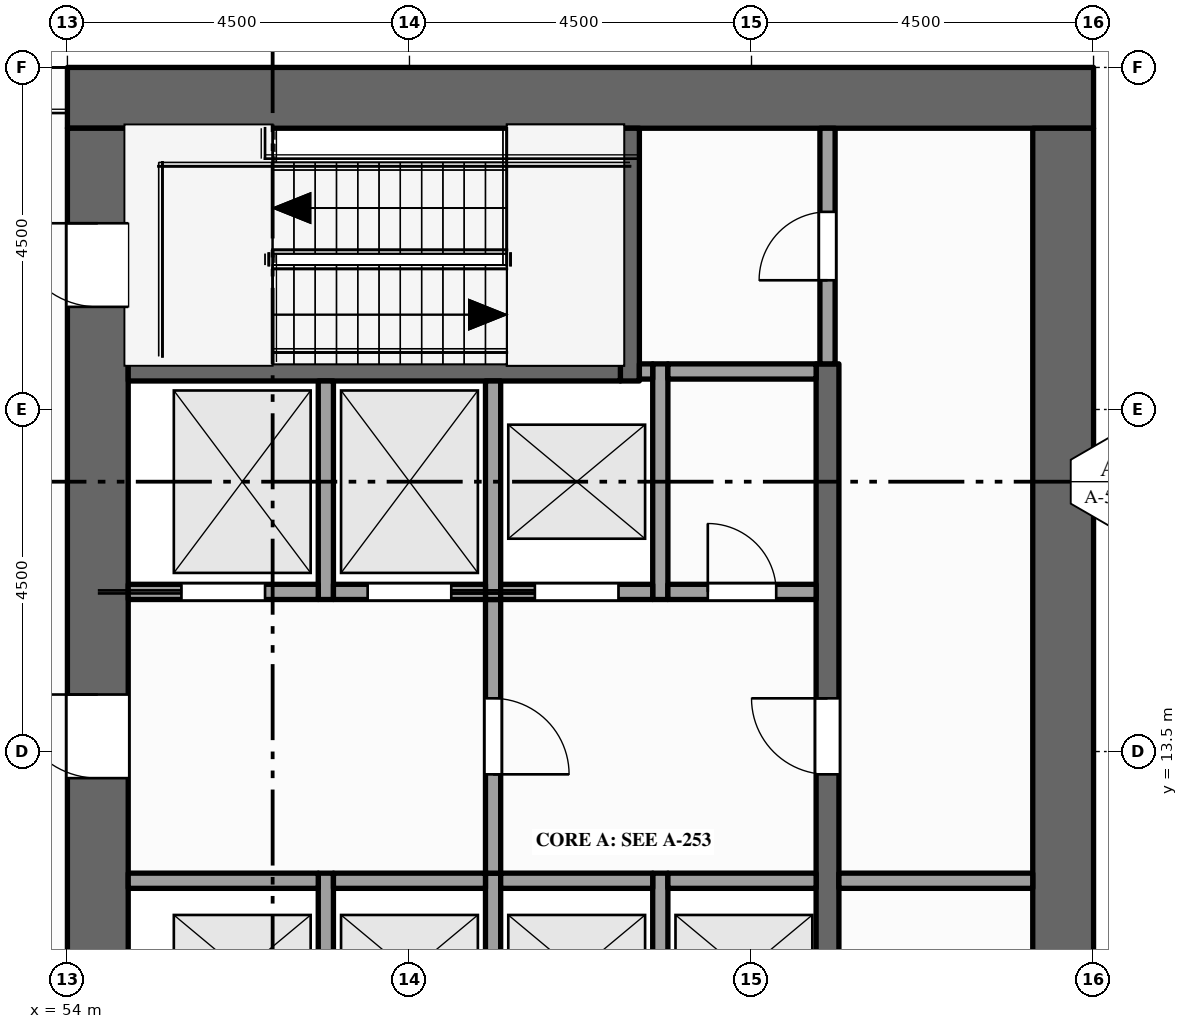
"""IFC4 building model, lengths in metres.
Left out: names, types, materials, properties, quantities, classifications, styles, units other than length and angle.
Written with IfcOpenShell. Run it as: python <this file> out.ifc"""

import sys

from ifc_helpers import new_model, si_unit, direction, frame, frame_2d, origin, place, context, subcontext, project, spatial, rectangle, extrude, element, fill, save


model = new_model("IFC4")
c1 = context("Model", 3, precision=1e-05, world=origin(), true_north=direction((0.0, 1.0)))
c2 = subcontext(c1, "Body", "Model", "MODEL_VIEW")
j1 = project(units=[si_unit("LENGTHUNIT", "METRE"), si_unit("PLANEANGLEUNIT", "RADIAN")], contexts=[c1])
p1 = place(None, origin())
s1 = spatial("IfcSite", under=j1, at=p1, CompositionType="ELEMENT")
p2 = place(p1, origin())
s2 = spatial("IfcBuilding", under=s1, at=p2, CompositionType="ELEMENT")
p3 = place(p2, frame((0.0, 0.0, 297.0)))
s3 = spatial("IfcBuildingStorey", under=s2, at=p3, CompositionType="ELEMENT", Elevation=297.0)
p4 = place(p3, frame((54.0, 22.1, -0.15), z_axis=(0.0, 0.0, 1.0), x_axis=(1.0, 0.0, 0.0)))
e1 = element("IfcWall", 1, at=p4, inside=s3, PredefinedType="SHEAR", context=c2, shape_type="SweptSolid", body=[
    extrude(rectangle(XDim=13.5, YDim=0.8, at=frame_2d((6.75, 0.0))), origin(), (0.0, 0.0, 1.0), 8.0),
])
p5 = place(p3, frame((54.4, 0.8, -0.15), z_axis=(0.0, 0.0, 1.0), x_axis=(0.0, 1.0, 0.0)))
e2 = element("IfcWall", 2, at=p5, inside=s3, PredefinedType="SHEAR", context=c2, shape_type="SweptSolid", body=[
    extrude(rectangle(XDim=20.9, YDim=0.8, at=frame_2d((10.45, 0.0))), origin(), (0.0, 0.0, 1.0), 8.0),
])
p6 = place(p5, frame((6.3, 0.0, 0.15)))
e3 = element("IfcOpeningElement", 3, at=p6, cuts=e2, PredefinedType="OPENING", context=c2, shape_type="SweptSolid", body=[
    extrude(rectangle(XDim=1.8, YDim=2.1, at=frame_2d((0.9, 1.05))), frame((0.0, 0.41, 0.0), z_axis=(0.0, -1.0, 0.0), x_axis=(1.0, 0.0, 0.0)), (0.0, 0.0, 1.0), 0.82),
])
p7 = place(p5, frame((12.35, 0.0, 0.15)))
e4 = element("IfcOpeningElement", 4, at=p7, cuts=e2, PredefinedType="OPENING", context=c2, shape_type="SweptSolid", body=[
    extrude(rectangle(XDim=1.1, YDim=2.1, at=frame_2d((0.55, 1.05))), frame((0.0, 0.41, 0.0), z_axis=(0.0, -1.0, 0.0), x_axis=(1.0, 0.0, 0.0)), (0.0, 0.0, 1.0), 0.82),
])
p8 = place(p5, frame((1.35, 0.0, 0.15)))
e5 = element("IfcOpeningElement", 5, at=p8, cuts=e2, PredefinedType="OPENING", context=c2, shape_type="SweptSolid", body=[
    extrude(rectangle(XDim=1.1, YDim=2.1, at=frame_2d((0.55, 1.05))), frame((0.0, 0.41, 0.0), z_axis=(0.0, -1.0, 0.0), x_axis=(1.0, 0.0, 0.0)), (0.0, 0.0, 1.0), 0.82),
])
p9 = place(p5, frame((18.55, 0.0, 0.15)))
e6 = element("IfcOpeningElement", 6, at=p9, cuts=e2, PredefinedType="OPENING", context=c2, shape_type="SweptSolid", body=[
    extrude(rectangle(XDim=1.1, YDim=2.1, at=frame_2d((0.55, 1.05))), frame((0.0, 0.41, 0.0), z_axis=(0.0, -1.0, 0.0), x_axis=(1.0, 0.0, 0.0)), (0.0, 0.0, 1.0), 0.82),
])
p10 = place(p3, frame((67.1, 0.8, -0.15), z_axis=(0.0, 0.0, 1.0), x_axis=(0.0, 1.0, 0.0)))
e7 = element("IfcWall", 7, at=p10, inside=s3, PredefinedType="SHEAR", context=c2, shape_type="SweptSolid", body=[
    extrude(rectangle(XDim=20.9, YDim=0.8, at=frame_2d((10.45, 0.0))), origin(), (0.0, 0.0, 1.0), 8.0),
])
p11 = place(p3, frame((57.4, 9.3, 0.0), z_axis=(0.0, 0.0, 1.0), x_axis=(0.0, 1.0, 0.0)))
e8 = element("IfcWall", 8, at=p11, inside=s3, PredefinedType="SOLIDWALL", context=c2, shape_type="SweptSolid", body=[
    extrude(rectangle(XDim=2.6, YDim=0.2, at=frame_2d((1.3, 0.0))), origin(), (0.0, 0.0, 1.0), 7.85),
])
p12 = place(p3, frame((57.4, 15.5, 0.0), z_axis=(0.0, 0.0, 1.0), x_axis=(0.0, 1.0, 0.0)))
e9 = element("IfcWall", 9, at=p12, inside=s3, PredefinedType="SOLIDWALL", context=c2, shape_type="SweptSolid", body=[
    extrude(rectangle(XDim=2.875, YDim=0.2, at=frame_2d((1.438, 0.0))), origin(), (0.0, 0.0, 1.0), 7.85),
])
p13 = place(p3, frame((59.6, 9.3, 0.0), z_axis=(0.0, 0.0, 1.0), x_axis=(0.0, 1.0, 0.0)))
e10 = element("IfcWall", 10, at=p13, inside=s3, PredefinedType="SOLIDWALL", context=c2, shape_type="SweptSolid", body=[
    extrude(rectangle(XDim=2.6, YDim=0.2, at=frame_2d((1.3, 0.0))), origin(), (0.0, 0.0, 1.0), 7.85),
])
p14 = place(p3, frame((59.6, 11.9, 0.0), z_axis=(0.0, 0.0, 1.0), x_axis=(0.0, 1.0, 0.0)))
e11 = element("IfcWall", 11, at=p14, inside=s3, PredefinedType="PARTITIONING", context=c2, shape_type="SweptSolid", body=[
    extrude(rectangle(XDim=3.6, YDim=0.2, at=frame_2d((1.8, 0.0))), origin(), (0.0, 0.0, 1.0), 7.85),
])
p15 = place(p14, frame((1.3, 0.0, 0.0)))
e12 = element("IfcOpeningElement", 12, at=p15, cuts=e11, PredefinedType="OPENING", context=c2, shape_type="SweptSolid", body=[
    extrude(rectangle(XDim=1.0, YDim=2.1, at=frame_2d((0.5, 1.05))), frame((0.0, 0.11, 0.0), z_axis=(0.0, -1.0, 0.0), x_axis=(1.0, 0.0, 0.0)), (0.0, 0.0, 1.0), 0.22),
])
p16 = place(p3, frame((59.6, 15.5, 0.0), z_axis=(0.0, 0.0, 1.0), x_axis=(0.0, 1.0, 0.0)))
e13 = element("IfcWall", 13, at=p16, inside=s3, PredefinedType="SOLIDWALL", context=c2, shape_type="SweptSolid", body=[
    extrude(rectangle(XDim=2.875, YDim=0.2, at=frame_2d((1.438, 0.0))), origin(), (0.0, 0.0, 1.0), 7.85),
])
p17 = place(p3, frame((61.4, 18.375, 0.0), z_axis=(0.0, 0.0, 1.0), x_axis=(0.0, 1.0, 0.0)))
e14 = element("IfcWall", 14, at=p17, inside=s3, PredefinedType="SHEAR", context=c2, shape_type="SweptSolid", body=[
    extrude(rectangle(XDim=3.325, YDim=0.25, at=frame_2d((1.663, 0.0))), origin(), (0.0, 0.0, 1.0), 7.85),
])
p18 = place(p3, frame((61.8, 9.3, 0.0), z_axis=(0.0, 0.0, 1.0), x_axis=(0.0, 1.0, 0.0)))
e15 = element("IfcWall", 15, at=p18, inside=s3, PredefinedType="SOLIDWALL", context=c2, shape_type="SweptSolid", body=[
    extrude(rectangle(XDim=2.6, YDim=0.2, at=frame_2d((1.3, 0.0))), origin(), (0.0, 0.0, 1.0), 7.85),
])
p19 = place(p3, frame((61.8, 15.5, 0.0), z_axis=(0.0, 0.0, 1.0), x_axis=(0.0, 1.0, 0.0)))
e16 = element("IfcWall", 16, at=p19, inside=s3, PredefinedType="SOLIDWALL", context=c2, shape_type="SweptSolid", body=[
    extrude(rectangle(XDim=3.1, YDim=0.2, at=frame_2d((1.55, 0.0))), origin(), (0.0, 0.0, 1.0), 7.85),
])
p20 = place(p3, frame((64.0, 4.1, 0.0), z_axis=(0.0, 0.0, 1.0), x_axis=(0.0, 1.0, 0.0)))
e17 = element("IfcWall", 17, at=p20, inside=s3, PredefinedType="SHEAR", context=c2, shape_type="SweptSolid", body=[
    extrude(rectangle(XDim=14.5, YDim=0.3, at=frame_2d((7.25, 0.0))), origin(), (0.0, 0.0, 1.0), 7.85),
])
p21 = place(p20, frame((3.4, 0.0, 0.0)))
e18 = element("IfcOpeningElement", 18, at=p21, cuts=e17, PredefinedType="OPENING", context=c2, shape_type="SweptSolid", body=[
    extrude(rectangle(XDim=1.0, YDim=2.1, at=frame_2d((0.5, 1.05))), frame((0.0, 0.16, 0.0), z_axis=(0.0, -1.0, 0.0), x_axis=(1.0, 0.0, 0.0)), (0.0, 0.0, 1.0), 0.32),
])
p22 = place(p20, frame((9.1, 0.0, 0.0)))
e19 = element("IfcOpeningElement", 19, at=p22, cuts=e17, PredefinedType="OPENING", context=c2, shape_type="SweptSolid", body=[
    extrude(rectangle(XDim=1.0, YDim=2.1, at=frame_2d((0.5, 1.05))), frame((0.0, 0.16, 0.0), z_axis=(0.0, -1.0, 0.0), x_axis=(1.0, 0.0, 0.0)), (0.0, 0.0, 1.0), 0.32),
])
p23 = place(p3, frame((64.0, 18.6, 0.0), z_axis=(0.0, 0.0, 1.0), x_axis=(0.0, 1.0, 0.0)))
e20 = element("IfcWall", 20, at=p23, inside=s3, PredefinedType="PARTITIONING", context=c2, shape_type="SweptSolid", body=[
    extrude(rectangle(XDim=3.1, YDim=0.2, at=frame_2d((1.55, 0.0))), origin(), (0.0, 0.0, 1.0), 7.85),
])
p24 = place(p23, frame((1.1, 0.0, 0.0)))
e21 = element("IfcOpeningElement", 21, at=p24, cuts=e20, PredefinedType="OPENING", context=c2, shape_type="SweptSolid", body=[
    extrude(rectangle(XDim=0.9, YDim=2.1, at=frame_2d((0.45, 1.05))), frame((0.0, 0.11, 0.0), z_axis=(0.0, -1.0, 0.0), x_axis=(1.0, 0.0, 0.0)), (0.0, 0.0, 1.0), 0.22),
])
p25 = place(p3, frame((54.8, 11.8, 0.0), z_axis=(0.0, 0.0, 1.0), x_axis=(1.0, 0.0, 0.0)))
e22 = element("IfcWall", 22, at=p25, inside=s3, PredefinedType="SOLIDWALL", context=c2, shape_type="SweptSolid", body=[
    extrude(rectangle(XDim=2.5, YDim=0.2, at=frame_2d((1.25, 0.0))), origin(), (0.0, 0.0, 1.0), 7.85),
])
for number, where, z_axis, x_axis in (
    (23, (57.5, 11.8, 0.0), (0.0, 0.0, 1.0), (1.0, 0.0, 0.0)),
    (24, (59.7, 11.8, 0.0), (0.0, 0.0, 1.0), (1.0, 0.0, 0.0)),
):
    element("IfcWall", number, at=place(p3, frame(where, z_axis=z_axis, x_axis=x_axis)), inside=s3, PredefinedType="SOLIDWALL", context=c2, shape_type="SweptSolid", body=[
        extrude(rectangle(XDim=2.0, YDim=0.2, at=frame_2d((1.0, 0.0))), origin(), (0.0, 0.0, 1.0), 7.85),
    ])
p26 = place(p3, frame((61.9, 11.8, 0.0), z_axis=(0.0, 0.0, 1.0), x_axis=(1.0, 0.0, 0.0)))
e25 = element("IfcWall", 25, at=p26, inside=s3, PredefinedType="SOLIDWALL", context=c2, shape_type="SweptSolid", body=[
    extrude(rectangle(XDim=1.95, YDim=0.2, at=frame_2d((0.975, 0.0))), origin(), (0.0, 0.0, 1.0), 7.85),
])
p27 = place(p3, frame((64.15, 11.8, 0.0), z_axis=(0.0, 0.0, 1.0), x_axis=(1.0, 0.0, 0.0)))
e26 = element("IfcWall", 26, at=p27, inside=s3, PredefinedType="PARTITIONING", context=c2, shape_type="SweptSolid", body=[
    extrude(rectangle(XDim=2.55, YDim=0.2, at=frame_2d((1.275, 0.0))), origin(), (0.0, 0.0, 1.0), 7.85),
])
p28 = place(p3, frame((54.8, 15.6, 0.0), z_axis=(0.0, 0.0, 1.0), x_axis=(1.0, 0.0, 0.0)))
e27 = element("IfcWall", 27, at=p28, inside=s3, PredefinedType="SOLIDWALL", context=c2, shape_type="SweptSolid", body=[
    extrude(rectangle(XDim=2.5, YDim=0.2, at=frame_2d((1.25, 0.0))), origin(), (0.0, 0.0, 1.0), 7.85),
])
p29 = place(p28, frame((0.7, 0.0, 0.012)))
e28 = element("IfcOpeningElement", 28, at=p29, cuts=e27, PredefinedType="OPENING", context=c2, shape_type="SweptSolid", body=[
    extrude(rectangle(XDim=1.1, YDim=2.1, at=frame_2d((0.55, 1.05))), frame((0.0, 0.11, 0.0), z_axis=(0.0, -1.0, 0.0), x_axis=(1.0, 0.0, 0.0)), (0.0, 0.0, 1.0), 0.22),
])
p30 = place(p3, frame((57.5, 15.6, 0.0), z_axis=(0.0, 0.0, 1.0), x_axis=(1.0, 0.0, 0.0)))
e29 = element("IfcWall", 29, at=p30, inside=s3, PredefinedType="SOLIDWALL", context=c2, shape_type="SweptSolid", body=[
    extrude(rectangle(XDim=2.0, YDim=0.2, at=frame_2d((1.0, 0.0))), origin(), (0.0, 0.0, 1.0), 7.85),
])
p31 = place(p30, frame((0.45, 0.0, 0.012)))
e30 = element("IfcOpeningElement", 30, at=p31, cuts=e29, PredefinedType="OPENING", context=c2, shape_type="SweptSolid", body=[
    extrude(rectangle(XDim=1.1, YDim=2.1, at=frame_2d((0.55, 1.05))), frame((0.0, 0.11, 0.0), z_axis=(0.0, -1.0, 0.0), x_axis=(1.0, 0.0, 0.0)), (0.0, 0.0, 1.0), 0.22),
])
p32 = place(p3, frame((59.7, 15.6, 0.0), z_axis=(0.0, 0.0, 1.0), x_axis=(1.0, 0.0, 0.0)))
e31 = element("IfcWall", 31, at=p32, inside=s3, PredefinedType="SOLIDWALL", context=c2, shape_type="SweptSolid", body=[
    extrude(rectangle(XDim=2.0, YDim=0.2, at=frame_2d((1.0, 0.0))), origin(), (0.0, 0.0, 1.0), 7.85),
])
p33 = place(p32, frame((0.45, 0.0, 0.012)))
e32 = element("IfcOpeningElement", 32, at=p33, cuts=e31, PredefinedType="OPENING", context=c2, shape_type="SweptSolid", body=[
    extrude(rectangle(XDim=1.1, YDim=2.1, at=frame_2d((0.55, 1.05))), frame((0.0, 0.11, 0.0), z_axis=(0.0, -1.0, 0.0), x_axis=(1.0, 0.0, 0.0)), (0.0, 0.0, 1.0), 0.22),
])
p34 = place(p3, frame((61.9, 15.6, 0.0), z_axis=(0.0, 0.0, 1.0), x_axis=(1.0, 0.0, 0.0)))
e33 = element("IfcWall", 33, at=p34, inside=s3, PredefinedType="PARTITIONING", context=c2, shape_type="SweptSolid", body=[
    extrude(rectangle(XDim=1.95, YDim=0.2, at=frame_2d((0.975, 0.0))), origin(), (0.0, 0.0, 1.0), 7.85),
])
p35 = place(p34, frame((0.525, 0.0, 0.0)))
e34 = element("IfcOpeningElement", 34, at=p35, cuts=e33, PredefinedType="OPENING", context=c2, shape_type="SweptSolid", body=[
    extrude(rectangle(XDim=0.9, YDim=2.1, at=frame_2d((0.45, 1.05))), frame((0.0, 0.11, 0.0), z_axis=(0.0, -1.0, 0.0), x_axis=(1.0, 0.0, 0.0)), (0.0, 0.0, 1.0), 0.22),
])
p36 = place(p3, frame((54.8, 18.5, 0.0), z_axis=(0.0, 0.0, 1.0), x_axis=(1.0, 0.0, 0.0)))
e35 = element("IfcWall", 35, at=p36, inside=s3, PredefinedType="SHEAR", context=c2, shape_type="SweptSolid", body=[
    extrude(rectangle(XDim=6.475, YDim=0.25, at=frame_2d((3.237, 0.0))), origin(), (0.0, 0.0, 1.0), 7.85),
])
p37 = place(p3, frame((61.525, 18.5, 0.0), z_axis=(0.0, 0.0, 1.0), x_axis=(1.0, 0.0, 0.0)))
e36 = element("IfcWall", 36, at=p37, inside=s3, PredefinedType="SOLIDWALL", context=c2, shape_type="SweptSolid", body=[
    extrude(rectangle(XDim=0.175, YDim=0.2, at=frame_2d((0.087, 0.0))), origin(), (0.0, 0.0, 1.0), 7.85),
])
p38 = place(p3, frame((61.9, 18.5, 0.0), z_axis=(0.0, 0.0, 1.0), x_axis=(1.0, 0.0, 0.0)))
e37 = element("IfcWall", 37, at=p38, inside=s3, PredefinedType="PARTITIONING", context=c2, shape_type="SweptSolid", body=[
    extrude(rectangle(XDim=1.95, YDim=0.2, at=frame_2d((0.975, 0.0))), origin(), (0.0, 0.0, 1.0), 7.85),
])
p39 = place(p29, origin())
e38 = element("IfcDoor", 38, at=p39, inside=s3, OperationType="SLIDING_TO_LEFT", PredefinedType="DOOR", context=c2, shape_type="SweptSolid", body=[
    extrude(rectangle(XDim=1.1, YDim=2.1, at=frame_2d((0.55, 1.05))), frame((0.0, 0.025, 0.0), z_axis=(0.0, -1.0, 0.0), x_axis=(1.0, 0.0, 0.0)), (0.0, 0.0, 1.0), 0.05),
])
fill(e28, e38)
p40 = place(p31, origin())
e39 = element("IfcDoor", 39, at=p40, inside=s3, OperationType="SLIDING_TO_RIGHT", PredefinedType="DOOR", context=c2, shape_type="SweptSolid", body=[
    extrude(rectangle(XDim=1.1, YDim=2.1, at=frame_2d((0.55, 1.05))), frame((0.0, 0.025, 0.0), z_axis=(0.0, -1.0, 0.0), x_axis=(1.0, 0.0, 0.0)), (0.0, 0.0, 1.0), 0.05),
])
fill(e30, e39)
p41 = place(p33, origin())
e40 = element("IfcDoor", 40, at=p41, inside=s3, OperationType="SLIDING_TO_LEFT", PredefinedType="DOOR", context=c2, shape_type="SweptSolid", body=[
    extrude(rectangle(XDim=1.1, YDim=2.1, at=frame_2d((0.55, 1.05))), frame((0.0, 0.025, 0.0), z_axis=(0.0, -1.0, 0.0), x_axis=(1.0, 0.0, 0.0)), (0.0, 0.0, 1.0), 0.05),
])
fill(e32, e40)
p42 = place(p7, origin())
e41 = element("IfcDoor", 41, at=p42, inside=s3, OperationType="SINGLE_SWING_RIGHT", PredefinedType="DOOR", context=c2, shape_type="SweptSolid", body=[
    extrude(rectangle(XDim=1.1, YDim=2.1, at=frame_2d((0.55, 1.05))), frame((0.0, 0.025, 0.0), z_axis=(0.0, -1.0, 0.0), x_axis=(1.0, 0.0, 0.0)), (0.0, 0.0, 1.0), 0.05),
])
fill(e4, e41)
p43 = place(p15, origin())
e42 = element("IfcDoor", 42, at=p43, inside=s3, OperationType="SINGLE_SWING_LEFT", PredefinedType="DOOR", context=c2, shape_type="SweptSolid", body=[
    extrude(rectangle(XDim=1.0, YDim=2.1, at=frame_2d((0.5, 1.05))), frame((0.0, 0.025, 0.0), z_axis=(0.0, -1.0, 0.0), x_axis=(1.0, 0.0, 0.0)), (0.0, 0.0, 1.0), 0.05),
])
fill(e12, e42)
p44 = place(p22, origin())
e43 = element("IfcDoor", 43, at=p44, inside=s3, OperationType="SINGLE_SWING_RIGHT", PredefinedType="DOOR", context=c2, shape_type="SweptSolid", body=[
    extrude(rectangle(XDim=1.0, YDim=2.1, at=frame_2d((0.5, 1.05))), frame((0.0, 0.025, 0.0), z_axis=(0.0, -1.0, 0.0), x_axis=(1.0, 0.0, 0.0)), (0.0, 0.0, 1.0), 0.05),
])
fill(e19, e43)
p45 = place(p9, origin())
e44 = element("IfcDoor", 44, at=p45, inside=s3, OperationType="SINGLE_SWING_RIGHT", PredefinedType="DOOR", context=c2, shape_type="SweptSolid", body=[
    extrude(rectangle(XDim=1.1, YDim=2.1, at=frame_2d((0.55, 1.05))), frame((0.0, 0.025, 0.0), z_axis=(0.0, -1.0, 0.0), x_axis=(1.0, 0.0, 0.0)), (0.0, 0.0, 1.0), 0.05),
])
fill(e6, e44)
p46 = place(p24, origin())
e45 = element("IfcDoor", 45, at=p46, inside=s3, OperationType="SINGLE_SWING_LEFT", PredefinedType="DOOR", context=c2, shape_type="SweptSolid", body=[
    extrude(rectangle(XDim=0.9, YDim=2.1, at=frame_2d((0.45, 1.05))), frame((0.0, 0.025, 0.0), z_axis=(0.0, -1.0, 0.0), x_axis=(1.0, 0.0, 0.0)), (0.0, 0.0, 1.0), 0.05),
])
fill(e21, e45)
p47 = place(p35, origin())
e46 = element("IfcDoor", 46, at=p47, inside=s3, OperationType="SINGLE_SWING_LEFT", PredefinedType="DOOR", context=c2, shape_type="SweptSolid", body=[
    extrude(rectangle(XDim=0.9, YDim=2.1, at=frame_2d((0.45, 1.05))), frame((0.0, 0.025, 0.0), z_axis=(0.0, -1.0, 0.0), x_axis=(1.0, 0.0, 0.0)), (0.0, 0.0, 1.0), 0.05),
])
fill(e34, e46)
save(model, sys.argv[1])
